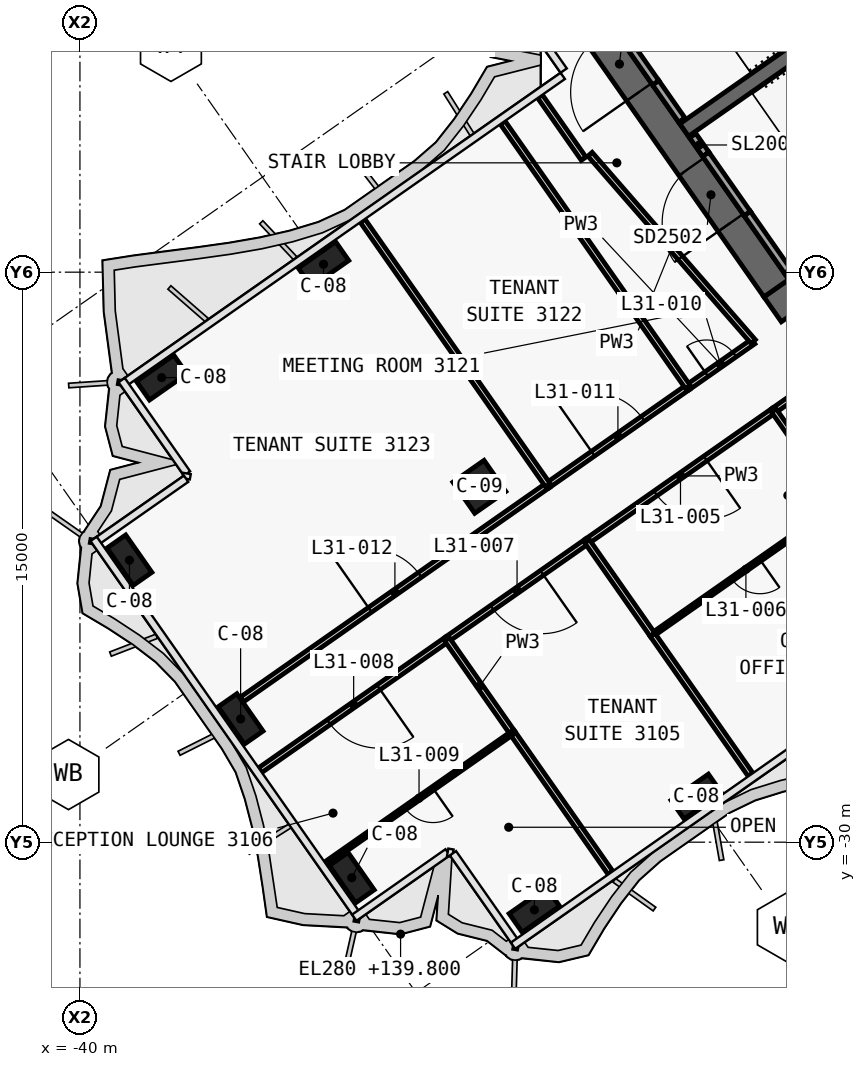
"""IFC4 building model, lengths in metres.
Left out: names, types, materials, properties, quantities, classifications, styles, units other than length and angle.
Written with IfcOpenShell. Run it as: python <this file> out.ifc"""

import sys

from ifc_helpers import new_model, si_unit, direction, frame, frame_2d, origin, origin_2d, place, context, subcontext, project, spatial, polyline, rectangle, outline, extrude, element, fill, save


model = new_model("IFC4")
c1 = context("Model", 3, precision=1e-05, world=origin(), true_north=direction((0.0, 1.0)))
c2 = subcontext(c1, "Body", "Model", "MODEL_VIEW")
j1 = project(units=[si_unit("LENGTHUNIT", "METRE"), si_unit("PLANEANGLEUNIT", "RADIAN")], contexts=[c1])
p1 = place(None, origin())
s1 = spatial("IfcSite", under=j1, at=p1, CompositionType="ELEMENT")
p2 = place(p1, origin())
s2 = spatial("IfcBuilding", under=s1, at=p2, CompositionType="ELEMENT")
p3 = place(p2, frame((0.0, 0.0, 139.8)))
s3 = spatial("IfcBuildingStorey", under=s2, at=p3, CompositionType="ELEMENT", Elevation=139.8)
p4 = place(p3, frame((0.029, -0.712, 0.0), z_axis=(0.0, 0.0, 1.0), x_axis=(-0.819151758019, -0.573576845187, 0.0)))
e1 = element("IfcWall", 1, at=p4, inside=s3, PredefinedType="SHEAR", context=c2, shape_type="SweptSolid", body=[
    extrude(outline(polyline([(26.616, 0.4), (0.56, 0.4), (-0.0, -0.4), (26.616, -0.4), (26.616, 0.4)])), origin(), (0.0, 0.0, 1.0), 3.9),
])
p5 = place(p4, frame((2.966, 0.0, 0.0)))
e2 = element("IfcOpeningElement", 2, at=p5, cuts=e1, PredefinedType="OPENING", context=c2, shape_type="SweptSolid", body=[
    extrude(rectangle(XDim=2.4, YDim=2.1, at=frame_2d((1.2, 1.05))), frame((0.0, 0.41, 0.0), z_axis=(0.0, -1.0, 0.0), x_axis=(1.0, 0.0, 0.0)), (0.0, 0.0, 1.0), 0.82),
])
p6 = place(p4, frame((11.916, 0.0, 0.0)))
e3 = element("IfcOpeningElement", 3, at=p6, cuts=e1, PredefinedType="OPENING", context=c2, shape_type="SweptSolid", body=[
    extrude(rectangle(XDim=2.4, YDim=2.1, at=frame_2d((1.2, 1.05))), frame((0.0, 0.41, 0.0), z_axis=(0.0, -1.0, 0.0), x_axis=(1.0, 0.0, 0.0)), (0.0, 0.0, 1.0), 0.82),
])
p7 = place(p3, frame((-21.675, -15.421, 0.0), z_axis=(0.0, 0.0, 1.0), x_axis=(-0.573581815061, 0.819148278049, 0.0)))
e4 = element("IfcWall", 4, at=p7, inside=s3, PredefinedType="SHEAR", context=c2, shape_type="SweptSolid", body=[
    extrude(outline(polyline([(0.0, 0.4), (0.0, -0.4), (9.6, -0.4), (9.6, 0.4), (0.0, 0.4)])), origin(), (0.0, 0.0, 1.0), 3.9),
])
p8 = place(p7, frame((6.3, 0.0, 0.0)))
e5 = element("IfcOpeningElement", 5, at=p8, cuts=e4, PredefinedType="OPENING", context=c2, shape_type="SweptSolid", body=[
    extrude(rectangle(XDim=1.8, YDim=2.1, at=frame_2d((0.9, 1.05))), frame((0.0, 0.41, 0.0), z_axis=(0.0, -1.0, 0.0), x_axis=(1.0, 0.0, 0.0)), (0.0, 0.0, 1.0), 0.82),
])
p9 = place(p7, frame((2.1, 0.0, 0.0)))
e6 = element("IfcOpeningElement", 6, at=p9, cuts=e4, PredefinedType="OPENING", context=c2, shape_type="SweptSolid", body=[
    extrude(rectangle(XDim=1.8, YDim=2.1, at=frame_2d((0.9, 1.05))), frame((0.0, 0.41, 0.0), z_axis=(0.0, -1.0, 0.0), x_axis=(1.0, 0.0, 0.0)), (0.0, 0.0, 1.0), 0.82),
])
p10 = place(p3, frame((-2.638, 3.768, 0.0), z_axis=(0.0, 0.0, 1.0), x_axis=(-0.81915267502, -0.573575535572, 0.0)))
e7 = element("IfcWall", 7, at=p10, inside=s3, PredefinedType="SHEAR", context=c2, shape_type="SweptSolid", body=[
    extrude(outline(polyline([(26.2, 0.2), (0.0, 0.2), (0.0, -0.2), (26.2, -0.2), (26.2, 0.2)])), origin(), (0.0, 0.0, 1.0), 3.9),
])
p11 = place(p10, frame((1.169, 0.0, 0.0)))
e8 = element("IfcOpeningElement", 8, at=p11, cuts=e7, PredefinedType="OPENING", context=c2, shape_type="SweptSolid", body=[
    extrude(rectangle(XDim=1.1, YDim=2.1, at=frame_2d((0.55, 1.05))), frame((0.0, 0.21, 0.0), z_axis=(0.0, -1.0, 0.0), x_axis=(1.0, 0.0, 0.0)), (0.0, 0.0, 1.0), 0.42),
])
p12 = place(p10, frame((3.206, 0.0, 0.0)))
e9 = element("IfcOpeningElement", 9, at=p12, cuts=e7, PredefinedType="OPENING", context=c2, shape_type="SweptSolid", body=[
    extrude(rectangle(XDim=1.1, YDim=2.1, at=frame_2d((0.55, 1.05))), frame((0.0, 0.21, 0.0), z_axis=(0.0, -1.0, 0.0), x_axis=(1.0, 0.0, 0.0)), (0.0, 0.0, 1.0), 0.42),
])
p13 = place(p10, frame((5.244, 0.0, 0.0)))
e10 = element("IfcOpeningElement", 10, at=p13, cuts=e7, PredefinedType="OPENING", context=c2, shape_type="SweptSolid", body=[
    extrude(rectangle(XDim=1.1, YDim=2.1, at=frame_2d((0.55, 1.05))), frame((0.0, 0.21, 0.0), z_axis=(0.0, -1.0, 0.0), x_axis=(1.0, 0.0, 0.0)), (0.0, 0.0, 1.0), 0.42),
])
p14 = place(p10, frame((7.281, 0.0, 0.0)))
e11 = element("IfcOpeningElement", 11, at=p14, cuts=e7, PredefinedType="OPENING", context=c2, shape_type="SweptSolid", body=[
    extrude(rectangle(XDim=1.1, YDim=2.1, at=frame_2d((0.55, 1.05))), frame((0.0, 0.21, 0.0), z_axis=(0.0, -1.0, 0.0), x_axis=(1.0, 0.0, 0.0)), (0.0, 0.0, 1.0), 0.42),
])
p15 = place(p10, frame((9.688, 0.0, 0.0)))
e12 = element("IfcOpeningElement", 12, at=p15, cuts=e7, PredefinedType="OPENING", context=c2, shape_type="SweptSolid", body=[
    extrude(rectangle(XDim=1.1, YDim=2.1, at=frame_2d((0.55, 1.05))), frame((0.0, 0.21, 0.0), z_axis=(0.0, -1.0, 0.0), x_axis=(1.0, 0.0, 0.0)), (0.0, 0.0, 1.0), 0.42),
])
p16 = place(p10, frame((11.863, 0.0, 0.0)))
e13 = element("IfcOpeningElement", 13, at=p16, cuts=e7, PredefinedType="OPENING", context=c2, shape_type="SweptSolid", body=[
    extrude(rectangle(XDim=1.1, YDim=2.1, at=frame_2d((0.55, 1.05))), frame((0.0, 0.21, 0.0), z_axis=(0.0, -1.0, 0.0), x_axis=(1.0, 0.0, 0.0)), (0.0, 0.0, 1.0), 0.42),
])
p17 = place(p10, frame((14.038, 0.0, 0.0)))
e14 = element("IfcOpeningElement", 14, at=p17, cuts=e7, PredefinedType="OPENING", context=c2, shape_type="SweptSolid", body=[
    extrude(rectangle(XDim=1.1, YDim=2.1, at=frame_2d((0.55, 1.05))), frame((0.0, 0.21, 0.0), z_axis=(0.0, -1.0, 0.0), x_axis=(1.0, 0.0, 0.0)), (0.0, 0.0, 1.0), 0.42),
])
p18 = place(p10, frame((16.212, 0.0, 0.0)))
e15 = element("IfcOpeningElement", 15, at=p18, cuts=e7, PredefinedType="OPENING", context=c2, shape_type="SweptSolid", body=[
    extrude(rectangle(XDim=1.1, YDim=2.1, at=frame_2d((0.55, 1.05))), frame((0.0, 0.21, 0.0), z_axis=(0.0, -1.0, 0.0), x_axis=(1.0, 0.0, 0.0)), (0.0, 0.0, 1.0), 0.42),
])
for number, where, z_axis, x_axis in (
    (16, (-23.782, -28.799, 0.0), (0.0, 0.0, 1.0), (-0.819, -0.574, 0.0)),
    (17, (-28.042, -31.782, 0.0), (0.0, 0.0, 1.0), (-0.819, -0.574, 0.0)),
    (18, (-33.591, -14.792, 0.0), (0.0, 0.0, 1.0), (-0.819, -0.574, 0.0)),
    (19, (-37.85, -17.774, 0.0), (0.0, 0.0, 1.0), (-0.819, -0.574, 0.0)),
    (20, (-32.847, -30.935, 0.0), (0.0, 0.0, 1.0), (-0.574, 0.819, 0.0)),
    (21, (-35.772, -26.757, 0.0), (0.0, 0.0, 1.0), (-0.574, 0.819, 0.0)),
    (22, (-38.698, -22.579, 0.0), (0.0, 0.0, 1.0), (-0.574, 0.819, 0.0)),
):
    element("IfcColumn", number, at=place(p3, frame(where, z_axis=z_axis, x_axis=x_axis)), inside=s3, PredefinedType="COLUMN", context=c2, shape_type="SweptSolid", body=[
        extrude(rectangle(XDim=1.2, YDim=0.6, at=origin_2d()), origin(), (0.0, 0.0, 1.0), 3.9),
    ])
p19 = place(p3, frame((-29.49, -20.649, 0.0), z_axis=(0.0, 0.0, 1.0), x_axis=(-0.819152044289, -0.573576436351, 0.0)))
e23 = element("IfcColumn", 23, at=p19, inside=s3, PredefinedType="COLUMN", context=c2, shape_type="SweptSolid", body=[
    extrude(rectangle(XDim=1.0, YDim=1.0, at=origin_2d()), origin(), (0.0, 0.0, 1.0), 3.9),
])
p20 = place(p3, frame((-24.162, -10.998, 0.0), z_axis=(0.0, 0.0, 1.0), x_axis=(-0.573612502218, 0.819126789514, 0.0)))
e24 = element("IfcWall", 24, at=p20, inside=s3, PredefinedType="SOLIDWALL", context=c2, shape_type="SweptSolid", body=[
    extrude(rectangle(XDim=1.2, YDim=0.2, at=frame_2d((0.6, 0.0))), origin(), (0.0, 0.0, 1.0), 3.62),
])
p21 = place(p3, frame((-24.85, -10.014, 2.15), z_axis=(0.0, 0.0, 1.0), x_axis=(-0.573505465124, 0.819201734296, 0.0)))
e25 = element("IfcWall", 25, at=p21, inside=s3, PredefinedType="SOLIDWALL", context=c2, shape_type="SweptSolid", body=[
    extrude(rectangle(XDim=1.9, YDim=0.2, at=frame_2d((0.95, 0.0))), origin(), (0.0, 0.0, 1.0), 1.47),
])
p22 = place(p3, frame((-14.851, -10.521, 0.0), z_axis=(0.0, 0.0, 1.0), x_axis=(-0.819141584393, -0.57359137434, 0.0)))
e26 = element("IfcWall", 26, at=p22, inside=s3, PredefinedType="SOLIDWALL", context=c2, shape_type="SweptSolid", body=[
    extrude(rectangle(XDim=8.0, YDim=0.2, at=frame_2d((4.0, 0.0))), origin(), (0.0, 0.0, 1.0), 3.62),
])
p23 = place(p3, frame((-21.38, -14.97, 0.0), z_axis=(0.0, 0.0, 1.0), x_axis=(-0.573559770908, 0.819163713305, 0.0)))
e27 = element("IfcWall", 27, at=p23, inside=s3, PredefinedType="SOLIDWALL", context=c2, shape_type="SweptSolid", body=[
    extrude(rectangle(XDim=1.85, YDim=0.2, at=frame_2d((0.925, 0.0))), origin(), (0.0, 0.0, 1.0), 3.62),
])
p24 = place(p3, frame((-23.531, -11.898, 0.0), z_axis=(0.0, 0.0, 1.0), x_axis=(-0.573708088123, 0.819059844958, 0.0)))
e28 = element("IfcWall", 28, at=p24, inside=s3, PredefinedType="SOLIDWALL", context=c2, shape_type="SweptSolid", body=[
    extrude(rectangle(XDim=0.6, YDim=0.2, at=frame_2d((0.3, 0.0))), origin(), (0.0, 0.0, 1.0), 3.62),
])
p25 = place(p3, frame((-22.441, -13.455, 2.15), z_axis=(0.0, 0.0, 1.0), x_axis=(-0.573591692345, 0.819141361715, 0.0)))
e29 = element("IfcWall", 29, at=p25, inside=s3, PredefinedType="SOLIDWALL", context=c2, shape_type="SweptSolid", body=[
    extrude(rectangle(XDim=1.9, YDim=0.2, at=frame_2d((0.95, 0.0))), origin(), (0.0, 0.0, 1.0), 1.47),
])
p26 = place(p3, frame((-24.002, -18.028, 0.0), z_axis=(0.0, 0.0, 1.0), x_axis=(0.819144473797, 0.573587247982, 0.0)))
e30 = element("IfcWall", 30, at=p26, inside=s3, PredefinedType="PARTITIONING", context=c2, shape_type="SweptSolid", body=[
    extrude(rectangle(XDim=2.099, YDim=0.15, at=frame_2d((1.049, 0.0))), origin(), (0.0, 0.0, 1.0), 3.0),
])
p27 = place(p26, frame((0.599, 0.0, 0.0)))
e31 = element("IfcOpeningElement", 31, at=p27, cuts=e30, PredefinedType="OPENING", context=c2, shape_type="SweptSolid", body=[
    extrude(rectangle(XDim=0.9, YDim=2.1, at=frame_2d((0.45, 1.05))), frame((0.0, 0.085, 0.0), z_axis=(0.0, -1.0, 0.0), x_axis=(1.0, 0.0, 0.0)), (0.0, 0.0, 1.0), 0.17),
])
p28 = place(p3, frame((-27.688, -20.609, 0.0), z_axis=(0.0, 0.0, 1.0), x_axis=(0.819165703328, 0.573556928727, 0.0)))
e32 = element("IfcWall", 32, at=p28, inside=s3, PredefinedType="PARTITIONING", context=c2, shape_type="SweptSolid", body=[
    extrude(rectangle(XDim=4.504, YDim=0.15, at=frame_2d((2.252, 0.0))), origin(), (0.0, 0.0, 1.0), 3.0),
])
p29 = place(p28, frame((1.452, 0.0, 0.0)))
e33 = element("IfcOpeningElement", 33, at=p29, cuts=e32, PredefinedType="OPENING", context=c2, shape_type="SweptSolid", body=[
    extrude(rectangle(XDim=1.6, YDim=2.1, at=frame_2d((0.8, 1.05))), frame((0.0, 0.085, 0.0), z_axis=(0.0, -1.0, 0.0), x_axis=(1.0, 0.0, 0.0)), (0.0, 0.0, 1.0), 0.17),
])
p30 = place(p3, frame((-35.739, -26.247, 0.0), z_axis=(0.0, 0.0, 1.0), x_axis=(0.819133916703, 0.573602324356, 0.0)))
e34 = element("IfcWall", 34, at=p30, inside=s3, PredefinedType="PARTITIONING", context=c2, shape_type="SweptSolid", body=[
    extrude(rectangle(XDim=9.832, YDim=0.15, at=frame_2d((4.916, 0.0))), origin(), (0.0, 0.0, 1.0), 3.0),
])
p31 = place(p30, frame((4.116, 0.0, 0.0)))
e35 = element("IfcOpeningElement", 35, at=p31, cuts=e34, PredefinedType="OPENING", context=c2, shape_type="SweptSolid", body=[
    extrude(rectangle(XDim=1.6, YDim=2.1, at=frame_2d((0.8, 1.05))), frame((0.0, 0.085, 0.0), z_axis=(0.0, -1.0, 0.0), x_axis=(1.0, 0.0, 0.0)), (0.0, 0.0, 1.0), 0.17),
])
p32 = place(p3, frame((-16.823, -15.198, 0.0), z_axis=(0.0, 0.0, 1.0), x_axis=(-0.819165052243, -0.573557858619, 0.0)))
e36 = element("IfcWall", 36, at=p32, inside=s3, PredefinedType="PARTITIONING", context=c2, shape_type="SweptSolid", body=[
    extrude(rectangle(XDim=6.004, YDim=0.15, at=frame_2d((3.002, 0.0))), origin(), (0.0, 0.0, 1.0), 3.0),
])
p33 = place(p32, frame((2.202, 0.0, 0.0)))
e37 = element("IfcOpeningElement", 37, at=p33, cuts=e36, PredefinedType="OPENING", context=c2, shape_type="SweptSolid", body=[
    extrude(rectangle(XDim=1.6, YDim=2.1, at=frame_2d((0.8, 1.05))), frame((0.0, 0.085, 0.0), z_axis=(0.0, -1.0, 0.0), x_axis=(1.0, 0.0, 0.0)), (0.0, 0.0, 1.0), 0.17),
])
p34 = place(p3, frame((-21.738, -18.639, 0.0), z_axis=(0.0, 0.0, 1.0), x_axis=(-0.819145946981, -0.573585144111, 0.0)))
e38 = element("IfcWall", 38, at=p34, inside=s3, PredefinedType="PARTITIONING", context=c2, shape_type="SweptSolid", body=[
    extrude(rectangle(XDim=6.004, YDim=0.15, at=frame_2d((3.002, 0.0))), origin(), (0.0, 0.0, 1.0), 3.62),
])
p35 = place(p34, frame((2.202, 0.0, 0.0)))
e39 = element("IfcOpeningElement", 39, at=p35, cuts=e38, PredefinedType="OPENING", context=c2, shape_type="SweptSolid", body=[
    extrude(rectangle(XDim=1.6, YDim=2.1, at=frame_2d((0.8, 1.05))), frame((0.0, 0.085, 0.0), z_axis=(0.0, -1.0, 0.0), x_axis=(1.0, 0.0, 0.0)), (0.0, 0.0, 1.0), 0.17),
])
p36 = place(p3, frame((-26.653, -22.081, 0.0), z_axis=(0.0, 0.0, 1.0), x_axis=(-0.819140235121, -0.573593301221, 0.0)))
e40 = element("IfcWall", 40, at=p36, inside=s3, PredefinedType="PARTITIONING", context=c2, shape_type="SweptSolid", body=[
    extrude(rectangle(XDim=4.504, YDim=0.15, at=frame_2d((2.252, 0.0))), origin(), (0.0, 0.0, 1.0), 3.0),
])
p37 = place(p36, frame((1.452, 0.0, 0.0)))
e41 = element("IfcOpeningElement", 41, at=p37, cuts=e40, PredefinedType="OPENING", context=c2, shape_type="SweptSolid", body=[
    extrude(rectangle(XDim=1.6, YDim=2.1, at=frame_2d((0.8, 1.05))), frame((0.0, 0.085, 0.0), z_axis=(0.0, -1.0, 0.0), x_axis=(1.0, 0.0, 0.0)), (0.0, 0.0, 1.0), 0.17),
])
p38 = place(p3, frame((-30.339, -24.662, 0.0), z_axis=(0.0, 0.0, 1.0), x_axis=(-0.819166940189, -0.573555162214, 0.0)))
e42 = element("IfcWall", 42, at=p38, inside=s3, PredefinedType="PARTITIONING", context=c2, shape_type="SweptSolid", body=[
    extrude(rectangle(XDim=6.002, YDim=0.15, at=frame_2d((3.001, 0.0))), origin(), (0.0, 0.0, 1.0), 2.9),
])
p39 = place(p38, frame((2.201, 0.0, 0.0)))
e43 = element("IfcOpeningElement", 43, at=p39, cuts=e42, PredefinedType="OPENING", context=c2, shape_type="SweptSolid", body=[
    extrude(rectangle(XDim=1.6, YDim=2.1, at=frame_2d((0.8, 1.05))), frame((0.0, 0.085, 0.0), z_axis=(0.0, -1.0, 0.0), x_axis=(1.0, 0.0, 0.0)), (0.0, 0.0, 1.0), 0.17),
])
p40 = place(p3, frame((-26.746, -12.014, 0.0), z_axis=(0.0, 0.0, 1.0), x_axis=(-0.573568836472, 0.819157365729, 0.0)))
e44 = element("IfcWall", 44, at=p40, inside=s3, PredefinedType="PARTITIONING", context=c2, shape_type="SweptSolid", body=[
    extrude(rectangle(XDim=2.0, YDim=0.15, at=frame_2d((1.0, 0.0))), origin(), (0.0, 0.0, 1.0), 3.0),
])
p41 = place(p3, frame((-22.284, -16.826, 0.0), z_axis=(0.0, 0.0, 1.0), x_axis=(-0.656758142177, 0.754101281449, 0.0)))
e45 = element("IfcWall", 45, at=p41, inside=s3, PredefinedType="PARTITIONING", context=c2, shape_type="SweptSolid", body=[
    extrude(rectangle(XDim=6.539, YDim=0.15, at=frame_2d((3.269, 0.0))), origin(), (0.0, 0.0, 1.0), 3.0),
])
p42 = place(p3, frame((-24.001, -18.026, 0.0), z_axis=(0.0, 0.0, 1.0), x_axis=(-0.573591492816, 0.819141501433, 0.0)))
e46 = element("IfcWall", 46, at=p42, inside=s3, PredefinedType="PARTITIONING", context=c2, shape_type="SweptSolid", body=[
    extrude(rectangle(XDim=8.5, YDim=0.15, at=frame_2d((4.25, 0.0))), origin(), (0.0, 0.0, 1.0), 3.0),
])
p43 = place(p3, frame((-27.687, -20.607, 0.0), z_axis=(0.0, 0.0, 1.0), x_axis=(-0.573572219642, 0.819154996844, 0.0)))
e47 = element("IfcWall", 47, at=p43, inside=s3, PredefinedType="PARTITIONING", context=c2, shape_type="SweptSolid", body=[
    extrude(rectangle(XDim=8.5, YDim=0.15, at=frame_2d((4.25, 0.0))), origin(), (0.0, 0.0, 1.0), 3.0),
])
p44 = place(p3, frame((-20.018, -21.1, 0.0), z_axis=(0.0, 0.0, 1.0), x_axis=(-0.573604249862, 0.819132568355, 0.0)))
e48 = element("IfcWall", 48, at=p44, inside=s3, PredefinedType="PARTITIONING", context=c2, shape_type="SweptSolid", body=[
    extrude(rectangle(XDim=3.002, YDim=0.15, at=frame_2d((1.501, 0.0))), origin(), (0.0, 0.0, 1.0), 3.62),
])
p45 = place(p3, frame((-20.019, -21.099, 0.0), z_axis=(0.0, 0.0, 1.0), x_axis=(-0.819149710902, -0.573579768758, 0.0)))
e49 = element("IfcWall", 49, at=p45, inside=s3, PredefinedType="PARTITIONING", context=c2, shape_type="SweptSolid", body=[
    extrude(rectangle(XDim=6.0, YDim=0.1, at=frame_2d((3.0, 0.0))), origin(), (0.0, 0.0, 1.0), 3.62),
])
p46 = place(p45, frame((2.55, 0.0, 0.0)))
e50 = element("IfcOpeningElement", 50, at=p46, cuts=e49, PredefinedType="OPENING", context=c2, shape_type="SweptSolid", body=[
    extrude(rectangle(XDim=0.9, YDim=2.1, at=frame_2d((0.45, 1.05))), frame((0.0, 0.06, 0.0), z_axis=(0.0, -1.0, 0.0), x_axis=(1.0, 0.0, 0.0)), (0.0, 0.0, 1.0), 0.12),
])
p47 = place(p3, frame((-22.353, -28.226, 0.0), z_axis=(0.0, 0.0, 1.0), x_axis=(-0.573589807488, 0.819142681555, 0.0)))
e51 = element("IfcWall", 51, at=p47, inside=s3, PredefinedType="PARTITIONING", context=c2, shape_type="SweptSolid", body=[
    extrude(rectangle(XDim=4.499, YDim=0.15, at=frame_2d((2.25, 0.0))), origin(), (0.0, 0.0, 1.0), 2.9),
])
p48 = place(p3, frame((-24.934, -24.54, 0.0), z_axis=(0.0, 0.0, 1.0), x_axis=(-0.573560650686, 0.819163097304, 0.0)))
e52 = element("IfcWall", 52, at=p48, inside=s3, PredefinedType="PARTITIONING", context=c2, shape_type="SweptSolid", body=[
    extrude(rectangle(XDim=3.0, YDim=0.15, at=frame_2d((1.5, 0.0))), origin(), (0.0, 0.0, 1.0), 3.62),
])
p49 = place(p3, frame((-26.039, -30.807, 0.0), z_axis=(0.0, 0.0, 1.0), x_axis=(-0.573593387921, 0.81914017441, 0.0)))
e53 = element("IfcWall", 53, at=p49, inside=s3, PredefinedType="PARTITIONING", context=c2, shape_type="SweptSolid", body=[
    extrude(rectangle(XDim=4.501, YDim=0.15, at=frame_2d((2.25, 0.0))), origin(), (0.0, 0.0, 1.0), 2.9),
])
p50 = place(p3, frame((-28.619, -27.122, 0.0), z_axis=(0.0, 0.0, 1.0), x_axis=(-0.57356603932, 0.81915932427, 0.0)))
e54 = element("IfcWall", 54, at=p50, inside=s3, PredefinedType="PARTITIONING", context=c2, shape_type="SweptSolid", body=[
    extrude(rectangle(XDim=3.002, YDim=0.15, at=frame_2d((1.501, 0.0))), origin(), (0.0, 0.0, 1.0), 3.62),
])
p51 = place(p3, frame((-28.62, -27.121, 0.0), z_axis=(0.0, 0.0, 1.0), x_axis=(-0.819149710902, -0.573579768758, 0.0)))
e55 = element("IfcWall", 55, at=p51, inside=s3, PredefinedType="PARTITIONING", context=c2, shape_type="SweptSolid", body=[
    extrude(rectangle(XDim=6.0, YDim=0.1, at=frame_2d((3.0, 0.0))), origin(), (0.0, 0.0, 1.0), 2.9),
])
p52 = place(p51, frame((2.55, 0.0, 0.0)))
e56 = element("IfcOpeningElement", 56, at=p52, cuts=e55, PredefinedType="OPENING", context=c2, shape_type="SweptSolid", body=[
    extrude(rectangle(XDim=0.9, YDim=2.1, at=frame_2d((0.45, 1.05))), frame((0.0, 0.06, 0.0), z_axis=(0.0, -1.0, 0.0), x_axis=(1.0, 0.0, 0.0)), (0.0, 0.0, 1.0), 0.12),
])
p53 = place(p8, origin())
e57 = element("IfcDoor", 57, at=p53, inside=s3, OperationType="DOUBLE_DOOR_SINGLE_SWING", PredefinedType="DOOR", context=c2, shape_type="SweptSolid", body=[
    extrude(rectangle(XDim=1.8, YDim=2.1, at=frame_2d((0.9, 1.05))), frame((0.0, 0.025, 0.0), z_axis=(0.0, -1.0, 0.0), x_axis=(1.0, 0.0, 0.0)), (0.0, 0.0, 1.0), 0.05),
])
fill(e5, e57)
p54 = place(p9, origin())
e58 = element("IfcDoor", 58, at=p54, inside=s3, OperationType="DOUBLE_DOOR_SINGLE_SWING", PredefinedType="DOOR", context=c2, shape_type="SweptSolid", body=[
    extrude(rectangle(XDim=1.8, YDim=2.1, at=frame_2d((0.9, 1.05))), frame((0.0, 0.025, 0.0), z_axis=(0.0, -1.0, 0.0), x_axis=(1.0, 0.0, 0.0)), (0.0, 0.0, 1.0), 0.05),
])
fill(e6, e58)
p55 = place(p35, origin())
e59 = element("IfcDoor", 59, at=p55, inside=s3, OperationType="DOUBLE_DOOR_SINGLE_SWING", PredefinedType="DOOR", context=c2, shape_type="SweptSolid", body=[
    extrude(rectangle(XDim=1.6, YDim=2.1, at=frame_2d((0.8, 1.05))), frame((0.0, 0.025, 0.0), z_axis=(0.0, -1.0, 0.0), x_axis=(1.0, 0.0, 0.0)), (0.0, 0.0, 1.0), 0.05),
])
fill(e39, e59)
p56 = place(p46, origin())
e60 = element("IfcDoor", 60, at=p56, inside=s3, OperationType="SINGLE_SWING_RIGHT", PredefinedType="DOOR", context=c2, shape_type="SweptSolid", body=[
    extrude(rectangle(XDim=0.9, YDim=2.1, at=frame_2d((0.45, 1.05))), frame((0.0, 0.025, 0.0), z_axis=(0.0, -1.0, 0.0), x_axis=(1.0, 0.0, 0.0)), (0.0, 0.0, 1.0), 0.05),
])
fill(e50, e60)
p57 = place(p37, origin())
e61 = element("IfcDoor", 61, at=p57, inside=s3, OperationType="DOUBLE_DOOR_SINGLE_SWING", PredefinedType="DOOR", context=c2, shape_type="SweptSolid", body=[
    extrude(rectangle(XDim=1.6, YDim=2.1, at=frame_2d((0.8, 1.05))), frame((0.0, 0.025, 0.0), z_axis=(0.0, -1.0, 0.0), x_axis=(1.0, 0.0, 0.0)), (0.0, 0.0, 1.0), 0.05),
])
fill(e41, e61)
p58 = place(p39, origin())
e62 = element("IfcDoor", 62, at=p58, inside=s3, OperationType="DOUBLE_DOOR_SINGLE_SWING", PredefinedType="DOOR", context=c2, shape_type="SweptSolid", body=[
    extrude(rectangle(XDim=1.6, YDim=2.1, at=frame_2d((0.8, 1.05))), frame((0.0, 0.025, 0.0), z_axis=(0.0, -1.0, 0.0), x_axis=(1.0, 0.0, 0.0)), (0.0, 0.0, 1.0), 0.05),
])
fill(e43, e62)
p59 = place(p52, origin())
e63 = element("IfcDoor", 63, at=p59, inside=s3, OperationType="SINGLE_SWING_LEFT", PredefinedType="DOOR", context=c2, shape_type="SweptSolid", body=[
    extrude(rectangle(XDim=0.9, YDim=2.1, at=frame_2d((0.45, 1.05))), frame((0.0, 0.025, 0.0), z_axis=(0.0, -1.0, 0.0), x_axis=(1.0, 0.0, 0.0)), (0.0, 0.0, 1.0), 0.05),
])
fill(e56, e63)
p60 = place(p27, origin())
e64 = element("IfcDoor", 64, at=p60, inside=s3, OperationType="SINGLE_SWING_RIGHT", PredefinedType="DOOR", context=c2, shape_type="SweptSolid", body=[
    extrude(rectangle(XDim=0.9, YDim=2.1, at=frame_2d((0.45, 1.05))), frame((0.0, 0.025, 0.0), z_axis=(0.0, -1.0, 0.0), x_axis=(1.0, 0.0, 0.0)), (0.0, 0.0, 1.0), 0.05),
])
fill(e31, e64)
p61 = place(p29, origin())
e65 = element("IfcDoor", 65, at=p61, inside=s3, OperationType="DOUBLE_DOOR_SINGLE_SWING", PredefinedType="DOOR", context=c2, shape_type="SweptSolid", body=[
    extrude(rectangle(XDim=1.6, YDim=2.1, at=frame_2d((0.8, 1.05))), frame((0.0, 0.025, 0.0), z_axis=(0.0, -1.0, 0.0), x_axis=(1.0, 0.0, 0.0)), (0.0, 0.0, 1.0), 0.05),
])
fill(e33, e65)
p62 = place(p31, origin())
e66 = element("IfcDoor", 66, at=p62, inside=s3, OperationType="DOUBLE_DOOR_SINGLE_SWING", PredefinedType="DOOR", context=c2, shape_type="SweptSolid", body=[
    extrude(rectangle(XDim=1.6, YDim=2.1, at=frame_2d((0.8, 1.05))), frame((0.0, 0.025, 0.0), z_axis=(0.0, -1.0, 0.0), x_axis=(1.0, 0.0, 0.0)), (0.0, 0.0, 1.0), 0.05),
])
fill(e35, e66)
save(model, sys.argv[1])
